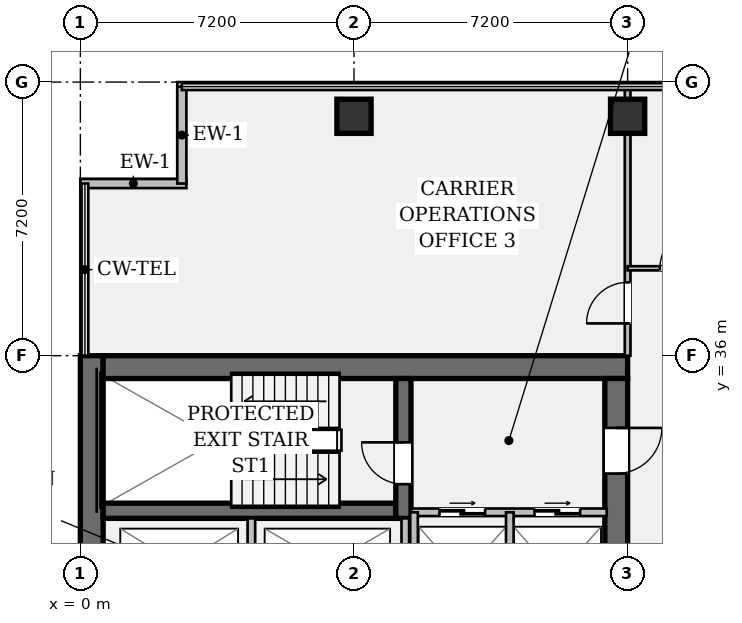
"""IFC4 building model, lengths in metres.
Left out: names, types, materials, properties, quantities, classifications, styles, units other than length and angle.
Written with IfcOpenShell. Run it as: python <this file> out.ifc"""

import sys

from ifc_helpers import new_model, si_unit, direction, frame, frame_2d, origin, origin_2d, place, context, subcontext, project, spatial, rectangle, hollow_rectangle, extrude, element, fill, save


model = new_model("IFC4")
c1 = context("Model", 3, precision=1e-05, world=origin(), true_north=direction((0.0, 1.0)))
c2 = subcontext(c1, "Body", "Model", "MODEL_VIEW")
j1 = project(units=[si_unit("LENGTHUNIT", "METRE"), si_unit("PLANEANGLEUNIT", "RADIAN")], contexts=[c1])
p1 = place(None, origin())
s1 = spatial("IfcSite", under=j1, at=p1, CompositionType="ELEMENT")
p2 = place(p1, origin())
s2 = spatial("IfcBuilding", under=s1, at=p2, CompositionType="ELEMENT")
p3 = place(p2, frame((0.0, 0.0, 133.0)))
s3 = spatial("IfcBuildingStorey", under=s2, at=p3, CompositionType="ELEMENT", Elevation=133.0)
p4 = place(p3, frame((0.3, 7.2, 0.0), z_axis=(0.0, 0.0, 1.0), x_axis=(0.0, 1.0, 0.0)))
e1 = element("IfcWall", 1, at=p4, inside=s3, PredefinedType="SHEAR", context=c2, shape_type="SweptSolid", body=[
    extrude(rectangle(XDim=28.8, YDim=0.6, at=frame_2d((14.4, 0.0))), origin(), (0.0, 0.0, 1.0), 3.58),
])
p5 = place(p3, frame((0.6, 35.7, 0.0), z_axis=(0.0, 0.0, 1.0), x_axis=(1.0, 0.0, 0.0)))
e2 = element("IfcWall", 2, at=p5, inside=s3, PredefinedType="SHEAR", context=c2, shape_type="SweptSolid", body=[
    extrude(rectangle(XDim=13.8, YDim=0.6, at=frame_2d((6.9, 0.0))), origin(), (0.0, 0.0, 1.0), 3.58),
])
p6 = place(p3, frame((14.1, 35.4, 0.0), z_axis=(0.0, 0.0, 1.0), x_axis=(0.0, -1.0, 0.0)))
e3 = element("IfcWall", 3, at=p6, inside=s3, PredefinedType="SHEAR", context=c2, shape_type="SweptSolid", body=[
    extrude(rectangle(XDim=27.6, YDim=0.6, at=frame_2d((13.8, 0.0))), origin(), (0.0, 0.0, 1.0), 3.58),
])
p7 = place(p6, frame((1.3, 0.0, 0.0)))
e4 = element("IfcOpeningElement", 4, at=p7, cuts=e3, PredefinedType="OPENING", context=c2, shape_type="SweptSolid", body=[
    extrude(rectangle(XDim=1.2, YDim=2.15, at=frame_2d((0.6, 1.075))), frame((0.0, 0.312, 0.0), z_axis=(0.0, -1.0, 0.0), x_axis=(1.0, 0.0, 0.0)), (0.0, 0.0, 1.0), 0.624),
])
p8 = place(p6, frame((25.25, 0.0, 0.0)))
e5 = element("IfcOpeningElement", 5, at=p8, cuts=e3, PredefinedType="OPENING", context=c2, shape_type="SweptSolid", body=[
    extrude(rectangle(XDim=1.2, YDim=2.15, at=frame_2d((0.6, 1.075))), frame((0.0, 0.312, 0.0), z_axis=(0.0, -1.0, 0.0), x_axis=(1.0, 0.0, 0.0)), (0.0, 0.0, 1.0), 0.624),
])
p9 = place(p6, frame((14.6, 0.0, 0.0)))
e6 = element("IfcOpeningElement", 6, at=p9, cuts=e3, PredefinedType="OPENING", context=c2, shape_type="SweptSolid", body=[
    extrude(rectangle(XDim=1.6, YDim=2.2, at=frame_2d((0.8, 1.1))), frame((0.0, 0.312, 0.0), z_axis=(0.0, -1.0, 0.0), x_axis=(1.0, 0.0, 0.0)), (0.0, 0.0, 1.0), 0.624),
])
p10 = place(p3, frame((0.6, 31.92, 0.0), z_axis=(0.0, 0.0, 1.0), x_axis=(1.0, 0.0, 0.0)))
e7 = element("IfcWall", 7, at=p10, inside=s3, PredefinedType="SHEAR", context=c2, shape_type="SweptSolid", body=[
    extrude(rectangle(XDim=7.7, YDim=0.4, at=frame_2d((3.85, 0.0))), origin(), (0.0, 0.0, 1.0), 3.58),
])
p11 = place(p3, frame((8.5, 31.72, 0.0), z_axis=(0.0, 0.0, 1.0), x_axis=(0.0, 1.0, 0.0)))
e8 = element("IfcWall", 8, at=p11, inside=s3, PredefinedType="SHEAR", context=c2, shape_type="SweptSolid", body=[
    extrude(rectangle(XDim=3.68, YDim=0.4, at=frame_2d((1.84, 0.0))), origin(), (0.0, 0.0, 1.0), 3.58),
])
p12 = place(p11, frame((0.9, 0.0, 0.0)))
e9 = element("IfcOpeningElement", 9, at=p12, cuts=e8, PredefinedType="OPENING", context=c2, shape_type="SweptSolid", body=[
    extrude(rectangle(XDim=1.1, YDim=2.15, at=frame_2d((0.55, 1.075))), frame((0.0, 0.212, 0.0), z_axis=(0.0, -1.0, 0.0), x_axis=(1.0, 0.0, 0.0)), (0.0, 0.0, 1.0), 0.424),
])
for number, where, z_axis, x_axis in (
    (10, (7.2, 42.3, 0.0), (0.0, 0.0, 1.0), (1.0, 0.0, 0.0)),
    (11, (14.4, 42.3, 0.0), (0.0, 0.0, 1.0), (1.0, 0.0, 0.0)),
):
    element("IfcColumn", number, at=place(p3, frame(where, z_axis=z_axis, x_axis=x_axis)), inside=s3, PredefinedType="COLUMN", context=c2, shape_type="SweptSolid", body=[
        extrude(hollow_rectangle(XDim=0.9, YDim=0.9, WallThickness=0.055, at=origin_2d()), origin(), (0.0, 0.0, 1.0), 3.58),
    ])
p13 = place(p3, frame((0.0, 40.53, 0.0), z_axis=(0.0, 0.0, 1.0), x_axis=(1.0, 0.0, 0.0)))
e12 = element("IfcWall", 12, at=p13, inside=s3, PredefinedType="STANDARD", context=c2, shape_type="SweptSolid", body=[
    extrude(rectangle(XDim=2.79, YDim=0.24, at=frame_2d((1.395, 0.0))), origin(), (0.0, 0.0, 1.0), 3.58),
])
p14 = place(p3, frame((2.67, 40.53, 0.0), z_axis=(0.0, 0.0, 1.0), x_axis=(0.0, 1.0, 0.0)))
e13 = element("IfcWall", 13, at=p14, inside=s3, PredefinedType="STANDARD", context=c2, shape_type="SweptSolid", body=[
    extrude(rectangle(XDim=2.55, YDim=0.24, at=frame_2d((1.275, 0.0))), origin(), (0.0, 0.0, 1.0), 3.58),
])
p15 = place(p3, frame((8.7, 31.88, 0.0), z_axis=(0.0, 0.0, 1.0), x_axis=(1.0, 0.0, 0.0)))
e14 = element("IfcWall", 14, at=p15, inside=s3, PredefinedType="PARTITIONING", context=c2, shape_type="SweptSolid", body=[
    extrude(rectangle(XDim=5.15, YDim=0.2, at=frame_2d((2.575, 0.0))), origin(), (0.0, 0.0, 1.0), 3.58),
])
p16 = place(p15, frame((0.75, 0.0, 0.0)))
e15 = element("IfcOpeningElement", 15, at=p16, cuts=e14, PredefinedType="OPENING", context=c2, shape_type="SweptSolid", body=[
    extrude(rectangle(XDim=1.2, YDim=2.2, at=frame_2d((0.6, 1.1))), frame((0.0, 0.112, 0.0), z_axis=(0.0, -1.0, 0.0), x_axis=(1.0, 0.0, 0.0)), (0.0, 0.0, 1.0), 0.224),
])
p17 = place(p15, frame((3.25, 0.0, 0.0)))
e16 = element("IfcOpeningElement", 16, at=p17, cuts=e14, PredefinedType="OPENING", context=c2, shape_type="SweptSolid", body=[
    extrude(rectangle(XDim=1.2, YDim=2.2, at=frame_2d((0.6, 1.1))), frame((0.0, 0.112, 0.0), z_axis=(0.0, -1.0, 0.0), x_axis=(1.0, 0.0, 0.0)), (0.0, 0.0, 1.0), 0.224),
])
for number, where, z_axis, x_axis in (
    (17, (8.78, 28.78, 0.0), (0.0, 0.0, 1.0), (0.0, 1.0, 0.0)),
    (18, (11.3, 28.78, 0.0), (0.0, 0.0, 1.0), (0.0, 1.0, 0.0)),
):
    element("IfcWall", number, at=place(p3, frame(where, z_axis=z_axis, x_axis=x_axis)), inside=s3, PredefinedType="PARTITIONING", context=c2, shape_type="SweptSolid", body=[
        extrude(rectangle(XDim=3.1, YDim=0.2, at=frame_2d((1.55, 0.0))), origin(), (0.0, 0.0, 1.0), 3.58),
    ])
for number, where, z_axis, x_axis in (
    (19, (4.5, 28.78, 0.0), (0.0, 0.0, 1.0), (0.0, 1.0, 0.0)),
    (20, (8.55, 28.78, 0.0), (0.0, 0.0, 1.0), (0.0, 1.0, 0.0)),
):
    element("IfcWall", number, at=place(p3, frame(where, z_axis=z_axis, x_axis=x_axis)), inside=s3, PredefinedType="PARTITIONING", context=c2, shape_type="SweptSolid", body=[
        extrude(rectangle(XDim=2.94, YDim=0.2, at=frame_2d((1.47, 0.0))), origin(), (0.0, 0.0, 1.0), 3.58),
    ])
p18 = place(p3, frame((14.4, 36.0, 0.0), z_axis=(0.0, 0.0, 1.0), x_axis=(0.0, 1.0, 0.0)))
e21 = element("IfcWall", 21, at=p18, inside=s3, PredefinedType="PARTITIONING", context=c2, shape_type="SweptSolid", body=[
    extrude(rectangle(XDim=7.08, YDim=0.15, at=frame_2d((3.54, 0.0))), origin(), (0.0, 0.0, 1.0), 2.869),
])
p19 = place(p18, frame((0.85, 0.0, 0.0)))
e22 = element("IfcOpeningElement", 22, at=p19, cuts=e21, PredefinedType="OPENING", context=c2, shape_type="SweptSolid", body=[
    extrude(rectangle(XDim=1.08, YDim=2.15, at=frame_2d((0.54, 1.075))), frame((0.0, 0.087, 0.0), z_axis=(0.0, -1.0, 0.0), x_axis=(1.0, 0.0, 0.0)), (0.0, 0.0, 1.0), 0.174),
])
p20 = place(p3, frame((14.4, 38.3, 0.0), z_axis=(0.0, 0.0, 1.0), x_axis=(1.0, 0.0, 0.0)))
e23 = element("IfcWall", 23, at=p20, inside=s3, PredefinedType="PARTITIONING", context=c2, shape_type="SweptSolid", body=[
    extrude(rectangle(XDim=2.95, YDim=0.11, at=frame_2d((1.475, 0.0))), origin(), (0.0, 0.0, 1.0), 3.148),
])
p21 = place(p20, frame((0.85, 0.0, 0.0)))
e24 = element("IfcOpeningElement", 24, at=p21, cuts=e23, PredefinedType="OPENING", context=c2, shape_type="SweptSolid", body=[
    extrude(rectangle(XDim=1.08, YDim=2.15, at=frame_2d((0.54, 1.075))), frame((0.0, 0.067, 0.0), z_axis=(0.0, -1.0, 0.0), x_axis=(1.0, 0.0, 0.0)), (0.0, 0.0, 1.0), 0.134),
])
p22 = place(p12, origin())
e25 = element("IfcDoor", 25, at=p22, inside=s3, OperationType="SINGLE_SWING_RIGHT", PredefinedType="DOOR", context=c2, shape_type="SweptSolid", body=[
    extrude(rectangle(XDim=1.1, YDim=2.15, at=frame_2d((0.55, 1.075))), frame((0.0, 0.025, 0.0), z_axis=(0.0, -1.0, 0.0), x_axis=(1.0, 0.0, 0.0)), (0.0, 0.0, 1.0), 0.05),
])
fill(e9, e25)
p23 = place(p7, origin())
e26 = element("IfcDoor", 26, at=p23, inside=s3, OperationType="SINGLE_SWING_LEFT", PredefinedType="DOOR", context=c2, shape_type="SweptSolid", body=[
    extrude(rectangle(XDim=1.2, YDim=2.15, at=frame_2d((0.6, 1.075))), frame((0.0, 0.025, 0.0), z_axis=(0.0, -1.0, 0.0), x_axis=(1.0, 0.0, 0.0)), (0.0, 0.0, 1.0), 0.05),
])
fill(e4, e26)
p24 = place(p16, origin())
e27 = element("IfcDoor", 27, at=p24, inside=s3, OperationType="DOUBLE_DOOR_SLIDING", PredefinedType="DOOR", context=c2, shape_type="SweptSolid", body=[
    extrude(rectangle(XDim=1.2, YDim=2.2, at=frame_2d((0.6, 1.1))), frame((0.0, 0.025, 0.0), z_axis=(0.0, -1.0, 0.0), x_axis=(1.0, 0.0, 0.0)), (0.0, 0.0, 1.0), 0.05),
])
fill(e15, e27)
p25 = place(p17, origin())
e28 = element("IfcDoor", 28, at=p25, inside=s3, OperationType="DOUBLE_DOOR_SLIDING", PredefinedType="DOOR", context=c2, shape_type="SweptSolid", body=[
    extrude(rectangle(XDim=1.2, YDim=2.2, at=frame_2d((0.6, 1.1))), frame((0.0, 0.025, 0.0), z_axis=(0.0, -1.0, 0.0), x_axis=(1.0, 0.0, 0.0)), (0.0, 0.0, 1.0), 0.05),
])
fill(e16, e28)
p26 = place(p19, origin())
e29 = element("IfcDoor", 29, at=p26, inside=s3, OperationType="SINGLE_SWING_LEFT", PredefinedType="DOOR", context=c2, shape_type="SweptSolid", body=[
    extrude(rectangle(XDim=1.08, YDim=2.15, at=frame_2d((0.54, 1.075))), frame((0.0, 0.025, 0.0), z_axis=(0.0, -1.0, 0.0), x_axis=(1.0, 0.0, 0.0)), (0.0, 0.0, 1.0), 0.05),
])
fill(e22, e29)
p27 = place(p21, origin())
e30 = element("IfcDoor", 30, at=p27, inside=s3, OperationType="SINGLE_SWING_RIGHT", PredefinedType="DOOR", context=c2, shape_type="SweptSolid", body=[
    extrude(rectangle(XDim=1.08, YDim=2.15, at=frame_2d((0.54, 1.075))), frame((0.0, 0.025, 0.0), z_axis=(0.0, -1.0, 0.0), x_axis=(1.0, 0.0, 0.0)), (0.0, 0.0, 1.0), 0.05),
])
fill(e24, e30)
save(model, sys.argv[1])
